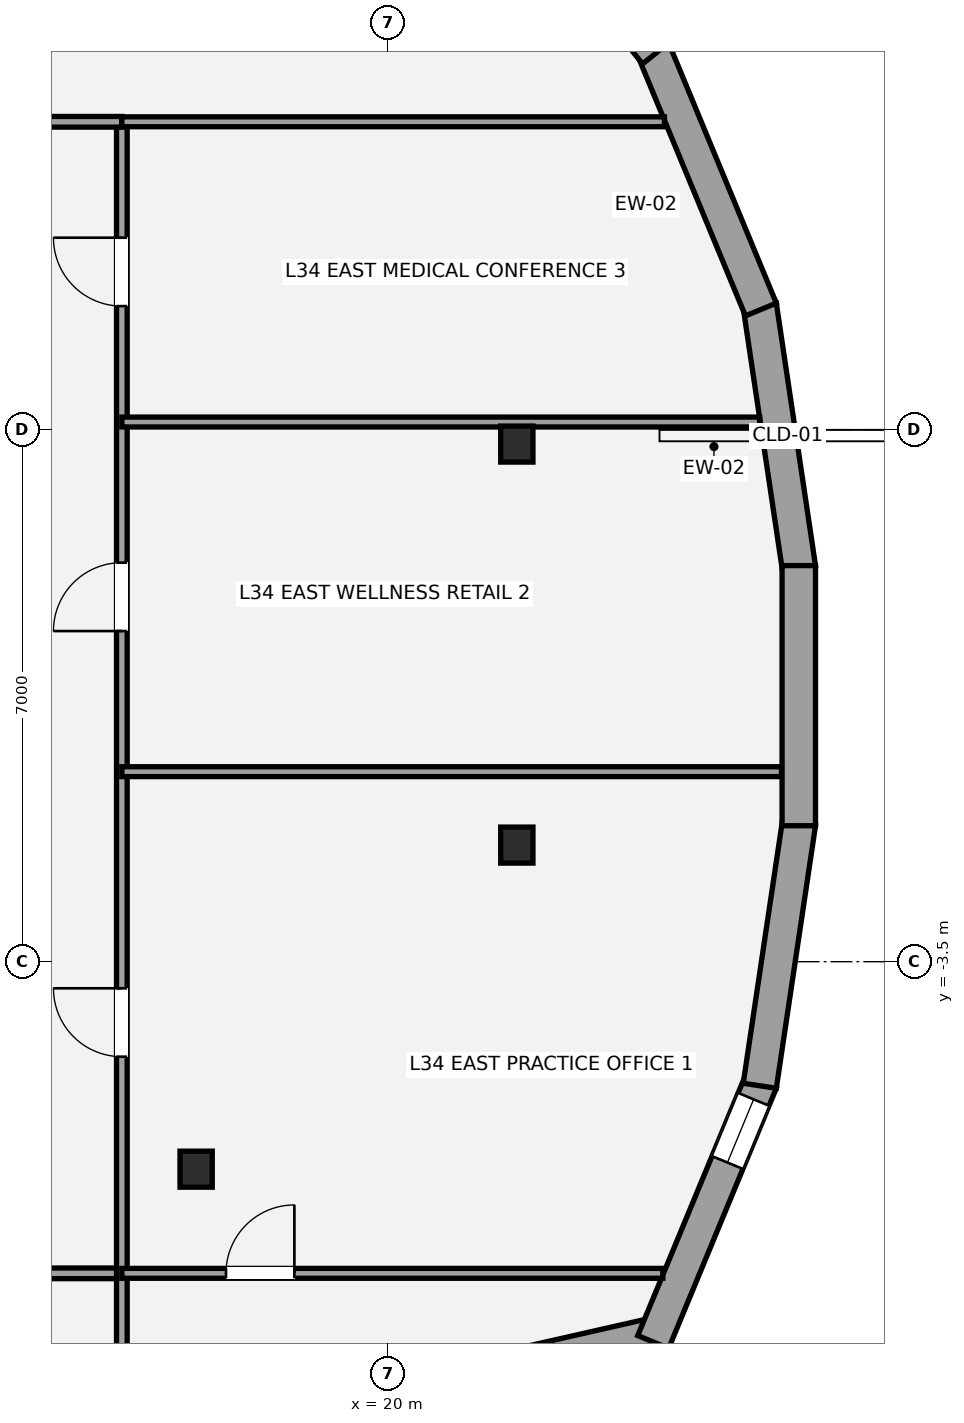
"""IFC4 building model, lengths in metres.
Left out: names, types, materials, properties, quantities, classifications, styles, units other than length and angle.
Written with IfcOpenShell. Run it as: python <this file> out.ifc"""

import sys

from ifc_helpers import new_model, si_unit, direction, frame, frame_2d, origin, origin_2d, place, context, subcontext, project, spatial, rectangle, i_section, extrude, element, fill, save


model = new_model("IFC4")
c1 = context("Model", 3, precision=1e-05, world=origin(), true_north=direction((0.0, 1.0)))
c2 = subcontext(c1, "Body", "Model", "MODEL_VIEW")
j1 = project(units=[si_unit("LENGTHUNIT", "METRE"), si_unit("PLANEANGLEUNIT", "RADIAN")], contexts=[c1])
p1 = place(None, origin())
s1 = spatial("IfcSite", under=j1, at=p1, CompositionType="ELEMENT")
p2 = place(p1, origin())
s2 = spatial("IfcBuilding", under=s1, at=p2, CompositionType="ELEMENT")
p3 = place(p2, frame((0.0, 0.0, 128.1)))
s3 = spatial("IfcBuildingStorey", under=s2, at=p3, CompositionType="ELEMENT", Elevation=128.1)
for number, where, z_axis, x_axis in (
    (1, (21.697, 3.31, 0.0), (0.0, 0.0, 1.0), (1.0, 0.0, 0.0)),
    (2, (17.477, -6.229, 0.0), (0.0, 0.0, 1.0), (1.0, 0.0, 0.0)),
    (3, (21.697, -1.966, 0.0), (0.0, 0.0, 1.0), (1.0, 0.0, 0.0)),
):
    element("IfcColumn", number, at=place(p3, frame(where, z_axis=z_axis, x_axis=x_axis)), inside=s3, PredefinedType="COLUMN", context=c2, shape_type="SweptSolid", body=[
        extrude(i_section(OverallWidth=0.424, OverallDepth=0.474, WebThickness=0.048, FlangeThickness=0.077, at=origin_2d()), origin(), (0.0, 0.0, 1.0), 3.5),
    ])
p4 = place(p3, frame((24.893, 5.132, 0.0), z_axis=(0.0, 0.0, 1.0), x_axis=(0.147673688434, -0.989036137734, 0.0)))
e4 = element("IfcWall", 4, at=p4, inside=s3, PredefinedType="STANDARD", context=c2, shape_type="SweptSolid", body=[
    extrude(rectangle(XDim=3.492, YDim=0.44, at=frame_2d((1.746, 0.0))), origin(), (0.0, 0.0, 1.0), 2.528),
])
p5 = place(p3, frame((23.491, 8.503, 0.0), z_axis=(0.0, 0.0, 1.0), x_axis=(0.382433297136, -0.923983102249, 0.0)))
e5 = element("IfcWall", 5, at=p5, inside=s3, PredefinedType="STANDARD", context=c2, shape_type="SweptSolid", body=[
    extrude(rectangle(XDim=3.704, YDim=0.44, at=frame_2d((1.852, 0.0))), origin(), (0.0, 0.0, 1.0), 2.528),
])
p6 = place(p3, frame((20.976, 11.629, 0.0), z_axis=(0.0, 0.0, 1.0), x_axis=(0.625169926256, -0.780488669556, 0.0)))
e6 = element("IfcWall", 6, at=p6, inside=s3, PredefinedType="STANDARD", context=c2, shape_type="SweptSolid", body=[
    extrude(rectangle(XDim=4.074, YDim=0.44, at=frame_2d((2.037, 0.0))), origin(), (0.0, 0.0, 1.0), 2.528),
])
p7 = place(p6, frame((2.826, 0.0, 0.58)))
e7 = element("IfcOpeningElement", 7, at=p7, cuts=e6, PredefinedType="OPENING", context=c2, shape_type="SweptSolid", body=[
    extrude(rectangle(XDim=0.9, YDim=1.35, at=frame_2d((0.45, 0.675))), frame((0.0, 0.23, 0.0), z_axis=(0.0, -1.0, 0.0), x_axis=(1.0, 0.0, 0.0)), (0.0, 0.0, 1.0), 0.46),
])
p8 = place(p3, frame((23.646, -8.373, 0.0), z_axis=(0.0, 0.0, 1.0), x_axis=(-0.975182593308, -0.22140214477, 0.0)))
e8 = element("IfcWall", 8, at=p8, inside=s3, PredefinedType="STANDARD", context=c2, shape_type="SweptSolid", body=[
    extrude(rectangle(XDim=6.217, YDim=0.44, at=frame_2d((3.108, 0.0))), origin(), (0.0, 0.0, 1.0), 2.532),
])
p9 = place(p3, frame((24.908, -5.081, 0.0), z_axis=(0.0, 0.0, 1.0), x_axis=(-0.382433297136, -0.923983102249, 0.0)))
e9 = element("IfcWall", 9, at=p9, inside=s3, PredefinedType="STANDARD", context=c2, shape_type="SweptSolid", body=[
    extrude(rectangle(XDim=3.704, YDim=0.44, at=frame_2d((1.852, 0.0))), origin(), (0.0, 0.0, 1.0), 2.528),
])
p10 = place(p9, frame((0.249, 0.0, 0.42)))
e10 = element("IfcOpeningElement", 10, at=p10, cuts=e9, PredefinedType="OPENING", context=c2, shape_type="SweptSolid", body=[
    extrude(rectangle(XDim=0.9, YDim=1.35, at=frame_2d((0.45, 0.675))), frame((0.0, 0.23, 0.0), z_axis=(0.0, -1.0, 0.0), x_axis=(1.0, 0.0, 0.0)), (0.0, 0.0, 1.0), 0.46),
])
p11 = place(p3, frame((25.409, -1.679, 0.0), z_axis=(0.0, 0.0, 1.0), x_axis=(-0.147673688434, -0.989036137734, 0.0)))
e11 = element("IfcWall", 11, at=p11, inside=s3, PredefinedType="STANDARD", context=c2, shape_type="SweptSolid", body=[
    extrude(rectangle(XDim=3.492, YDim=0.44, at=frame_2d((1.746, 0.0))), origin(), (0.0, 0.0, 1.0), 2.528),
])
p12 = place(p3, frame((25.406, 1.711, 0.0), z_axis=(0.0, 0.0, 1.0), x_axis=(0.0, -1.0, 0.0)))
e12 = element("IfcWall", 12, at=p12, inside=s3, PredefinedType="STANDARD", context=c2, shape_type="SweptSolid", body=[
    extrude(rectangle(XDim=3.422, YDim=0.44, at=frame_2d((1.711, 0.0))), origin(), (0.0, 0.0, 1.0), 2.528),
])
p13 = place(p3, frame((-15.7, -7.6, 0.0), z_axis=(0.0, 0.0, 1.0), x_axis=(1.0, 0.0, 0.0)))
e13 = element("IfcWall", 13, at=p13, inside=s3, PredefinedType="PARTITIONING", context=c2, shape_type="SweptSolid", body=[
    extrude(rectangle(XDim=32.2, YDim=0.14, at=frame_2d((16.1, 0.0))), origin(), (0.0, 0.0, 1.0), 2.688),
])
p14 = place(p13, frame((5.9, 0.0, 0.0)))
e14 = element("IfcOpeningElement", 14, at=p14, cuts=e13, PredefinedType="OPENING", context=c2, shape_type="SweptSolid", body=[
    extrude(rectangle(XDim=0.9, YDim=2.1, at=frame_2d((0.45, 1.05))), frame((0.0, 0.08, 0.0), z_axis=(0.0, -1.0, 0.0), x_axis=(1.0, 0.0, 0.0)), (0.0, 0.0, 1.0), 0.16),
])
p15 = place(p13, frame((16.5, 0.0, 0.0)))
e15 = element("IfcOpeningElement", 15, at=p15, cuts=e13, PredefinedType="OPENING", context=c2, shape_type="SweptSolid", body=[
    extrude(rectangle(XDim=0.9, YDim=2.1, at=frame_2d((0.45, 1.05))), frame((0.0, 0.08, 0.0), z_axis=(0.0, -1.0, 0.0), x_axis=(1.0, 0.0, 0.0)), (0.0, 0.0, 1.0), 0.16),
])
p16 = place(p13, frame((23.559, 0.0, 0.0)))
e16 = element("IfcOpeningElement", 16, at=p16, cuts=e13, PredefinedType="OPENING", context=c2, shape_type="SweptSolid", body=[
    extrude(rectangle(XDim=0.9, YDim=2.1, at=frame_2d((0.45, 1.05))), frame((0.0, 0.08, 0.0), z_axis=(0.0, -1.0, 0.0), x_axis=(1.0, 0.0, 0.0)), (0.0, 0.0, 1.0), 0.16),
])
p17 = place(p13, frame((27.619, 0.0, 0.0)))
e17 = element("IfcOpeningElement", 17, at=p17, cuts=e13, PredefinedType="OPENING", context=c2, shape_type="SweptSolid", body=[
    extrude(rectangle(XDim=0.9, YDim=2.1, at=frame_2d((0.45, 1.05))), frame((0.0, 0.08, 0.0), z_axis=(0.0, -1.0, 0.0), x_axis=(1.0, 0.0, 0.0)), (0.0, 0.0, 1.0), 0.16),
])
p18 = place(p13, frame((30.309, 0.0, 0.0)))
e18 = element("IfcOpeningElement", 18, at=p18, cuts=e13, PredefinedType="OPENING", context=c2, shape_type="SweptSolid", body=[
    extrude(rectangle(XDim=0.9, YDim=2.1, at=frame_2d((0.45, 1.05))), frame((0.0, 0.08, 0.0), z_axis=(0.0, -1.0, 0.0), x_axis=(1.0, 0.0, 0.0)), (0.0, 0.0, 1.0), 0.16),
])
p19 = place(p3, frame((16.5, -10.633, 0.0), z_axis=(0.0, 0.0, 1.0), x_axis=(0.0, 1.0, 0.0)))
e19 = element("IfcWall", 19, at=p19, inside=s3, PredefinedType="PARTITIONING", context=c2, shape_type="SweptSolid", body=[
    extrude(rectangle(XDim=18.183, YDim=0.14, at=frame_2d((9.091, 0.0))), origin(), (0.0, 0.0, 1.0), 2.763),
])
p20 = place(p19, frame((5.883, 0.0, 0.0)))
e20 = element("IfcOpeningElement", 20, at=p20, cuts=e19, PredefinedType="OPENING", context=c2, shape_type="SweptSolid", body=[
    extrude(rectangle(XDim=0.9, YDim=2.1, at=frame_2d((0.45, 1.05))), frame((0.0, 0.08, 0.0), z_axis=(0.0, -1.0, 0.0), x_axis=(1.0, 0.0, 0.0)), (0.0, 0.0, 1.0), 0.16),
])
p21 = place(p19, frame((11.483, 0.0, 0.0)))
e21 = element("IfcOpeningElement", 21, at=p21, cuts=e19, PredefinedType="OPENING", context=c2, shape_type="SweptSolid", body=[
    extrude(rectangle(XDim=0.9, YDim=2.1, at=frame_2d((0.45, 1.05))), frame((0.0, 0.08, 0.0), z_axis=(0.0, -1.0, 0.0), x_axis=(1.0, 0.0, 0.0)), (0.0, 0.0, 1.0), 0.16),
])
p22 = place(p19, frame((15.758, 0.0, 0.0)))
e22 = element("IfcOpeningElement", 22, at=p22, cuts=e19, PredefinedType="OPENING", context=c2, shape_type="SweptSolid", body=[
    extrude(rectangle(XDim=0.9, YDim=2.1, at=frame_2d((0.45, 1.05))), frame((0.0, 0.08, 0.0), z_axis=(0.0, -1.0, 0.0), x_axis=(1.0, 0.0, 0.0)), (0.0, 0.0, 1.0), 0.16),
])
p23 = place(p3, frame((13.9, 7.55, 0.0), z_axis=(0.0, 0.0, 1.0), x_axis=(1.0, 0.0, 0.0)))
e23 = element("IfcWall", 23, at=p23, inside=s3, PredefinedType="PARTITIONING", context=c2, shape_type="SweptSolid", body=[
    extrude(rectangle(XDim=2.6, YDim=0.14, at=frame_2d((1.3, 0.0))), origin(), (0.0, 0.0, 1.0), 3.31),
])
p24 = place(p23, frame((0.32, 0.0, 0.0)))
e24 = element("IfcOpeningElement", 24, at=p24, cuts=e23, PredefinedType="OPENING", context=c2, shape_type="SweptSolid", body=[
    extrude(rectangle(XDim=0.92, YDim=2.15, at=frame_2d((0.46, 1.075))), frame((0.0, 0.08, 0.0), z_axis=(0.0, -1.0, 0.0), x_axis=(1.0, 0.0, 0.0)), (0.0, 0.0, 1.0), 0.16),
])
p25 = place(p3, frame((16.5, 7.55, 0.0), z_axis=(0.0, 0.0, 1.0), x_axis=(1.0, 0.0, 0.0)))
e25 = element("IfcWall", 25, at=p25, inside=s3, PredefinedType="PARTITIONING", context=c2, shape_type="SweptSolid", body=[
    extrude(rectangle(XDim=7.139, YDim=0.13, at=frame_2d((3.569, 0.0))), origin(), (0.0, 0.0, 1.0), 2.763),
])
p26 = place(p3, frame((16.5, -7.6, 0.0), z_axis=(0.0, 0.0, 1.0), x_axis=(1.0, 0.0, 0.0)))
e26 = element("IfcWall", 26, at=p26, inside=s3, PredefinedType="PARTITIONING", context=c2, shape_type="SweptSolid", body=[
    extrude(rectangle(XDim=7.118, YDim=0.13, at=frame_2d((3.559, 0.0))), origin(), (0.0, 0.0, 1.0), 2.763),
])
p27 = place(p26, frame((1.37, 0.0, 0.0)))
e27 = element("IfcOpeningElement", 27, at=p27, cuts=e26, PredefinedType="OPENING", context=c2, shape_type="SweptSolid", body=[
    extrude(rectangle(XDim=0.9, YDim=2.1, at=frame_2d((0.45, 1.05))), frame((0.0, 0.075, 0.0), z_axis=(0.0, -1.0, 0.0), x_axis=(1.0, 0.0, 0.0)), (0.0, 0.0, 1.0), 0.15),
])
p28 = place(p3, frame((16.5, -1.0, 0.0), z_axis=(0.0, 0.0, 1.0), x_axis=(1.0, 0.0, 0.0)))
e28 = element("IfcWall", 28, at=p28, inside=s3, PredefinedType="PARTITIONING", context=c2, shape_type="SweptSolid", body=[
    extrude(rectangle(XDim=8.678, YDim=0.13, at=frame_2d((4.339, 0.0))), origin(), (0.0, 0.0, 1.0), 2.763),
])
p29 = place(p3, frame((16.5, 3.6, 0.0), z_axis=(0.0, 0.0, 1.0), x_axis=(1.0, 0.0, 0.0)))
e29 = element("IfcWall", 29, at=p29, inside=s3, PredefinedType="PARTITIONING", context=c2, shape_type="SweptSolid", body=[
    extrude(rectangle(XDim=8.392, YDim=0.13, at=frame_2d((4.196, 0.0))), origin(), (0.0, 0.0, 1.0), 2.763),
])
p30 = place(p10, origin())
e30 = element("IfcWindow", 30, at=p30, inside=s3, PartitioningType="SINGLE_PANEL", PredefinedType="WINDOW", context=c2, shape_type="SweptSolid", body=[
    extrude(rectangle(XDim=0.9, YDim=1.35, at=frame_2d((0.45, 0.675))), frame((0.0, -0.01, 0.0), z_axis=(0.0, -1.0, 0.0), x_axis=(1.0, 0.0, 0.0)), (0.0, 0.0, 1.0), 0.06),
])
fill(e10, e30)
p31 = place(p27, origin())
e31 = element("IfcDoor", 31, at=p31, inside=s3, OperationType="SINGLE_SWING_RIGHT", PredefinedType="DOOR", context=c2, shape_type="SweptSolid", body=[
    extrude(rectangle(XDim=0.9, YDim=2.1, at=frame_2d((0.45, 1.05))), frame((0.0, 0.025, 0.0), z_axis=(0.0, -1.0, 0.0), x_axis=(1.0, 0.0, 0.0)), (0.0, 0.0, 1.0), 0.05),
])
fill(e27, e31)
p32 = place(p20, origin())
e32 = element("IfcDoor", 32, at=p32, inside=s3, OperationType="SINGLE_SWING_RIGHT", PredefinedType="DOOR", context=c2, shape_type="SweptSolid", body=[
    extrude(rectangle(XDim=0.9, YDim=2.1, at=frame_2d((0.45, 1.05))), frame((0.0, 0.025, 0.0), z_axis=(0.0, -1.0, 0.0), x_axis=(1.0, 0.0, 0.0)), (0.0, 0.0, 1.0), 0.05),
])
fill(e20, e32)
p33 = place(p21, origin())
e33 = element("IfcDoor", 33, at=p33, inside=s3, OperationType="SINGLE_SWING_LEFT", PredefinedType="DOOR", context=c2, shape_type="SweptSolid", body=[
    extrude(rectangle(XDim=0.9, YDim=2.1, at=frame_2d((0.45, 1.05))), frame((0.0, 0.025, 0.0), z_axis=(0.0, -1.0, 0.0), x_axis=(1.0, 0.0, 0.0)), (0.0, 0.0, 1.0), 0.05),
])
fill(e21, e33)
p34 = place(p22, origin())
e34 = element("IfcDoor", 34, at=p34, inside=s3, OperationType="SINGLE_SWING_RIGHT", PredefinedType="DOOR", context=c2, shape_type="SweptSolid", body=[
    extrude(rectangle(XDim=0.9, YDim=2.1, at=frame_2d((0.45, 1.05))), frame((0.0, 0.025, 0.0), z_axis=(0.0, -1.0, 0.0), x_axis=(1.0, 0.0, 0.0)), (0.0, 0.0, 1.0), 0.05),
])
fill(e22, e34)
save(model, sys.argv[1])
